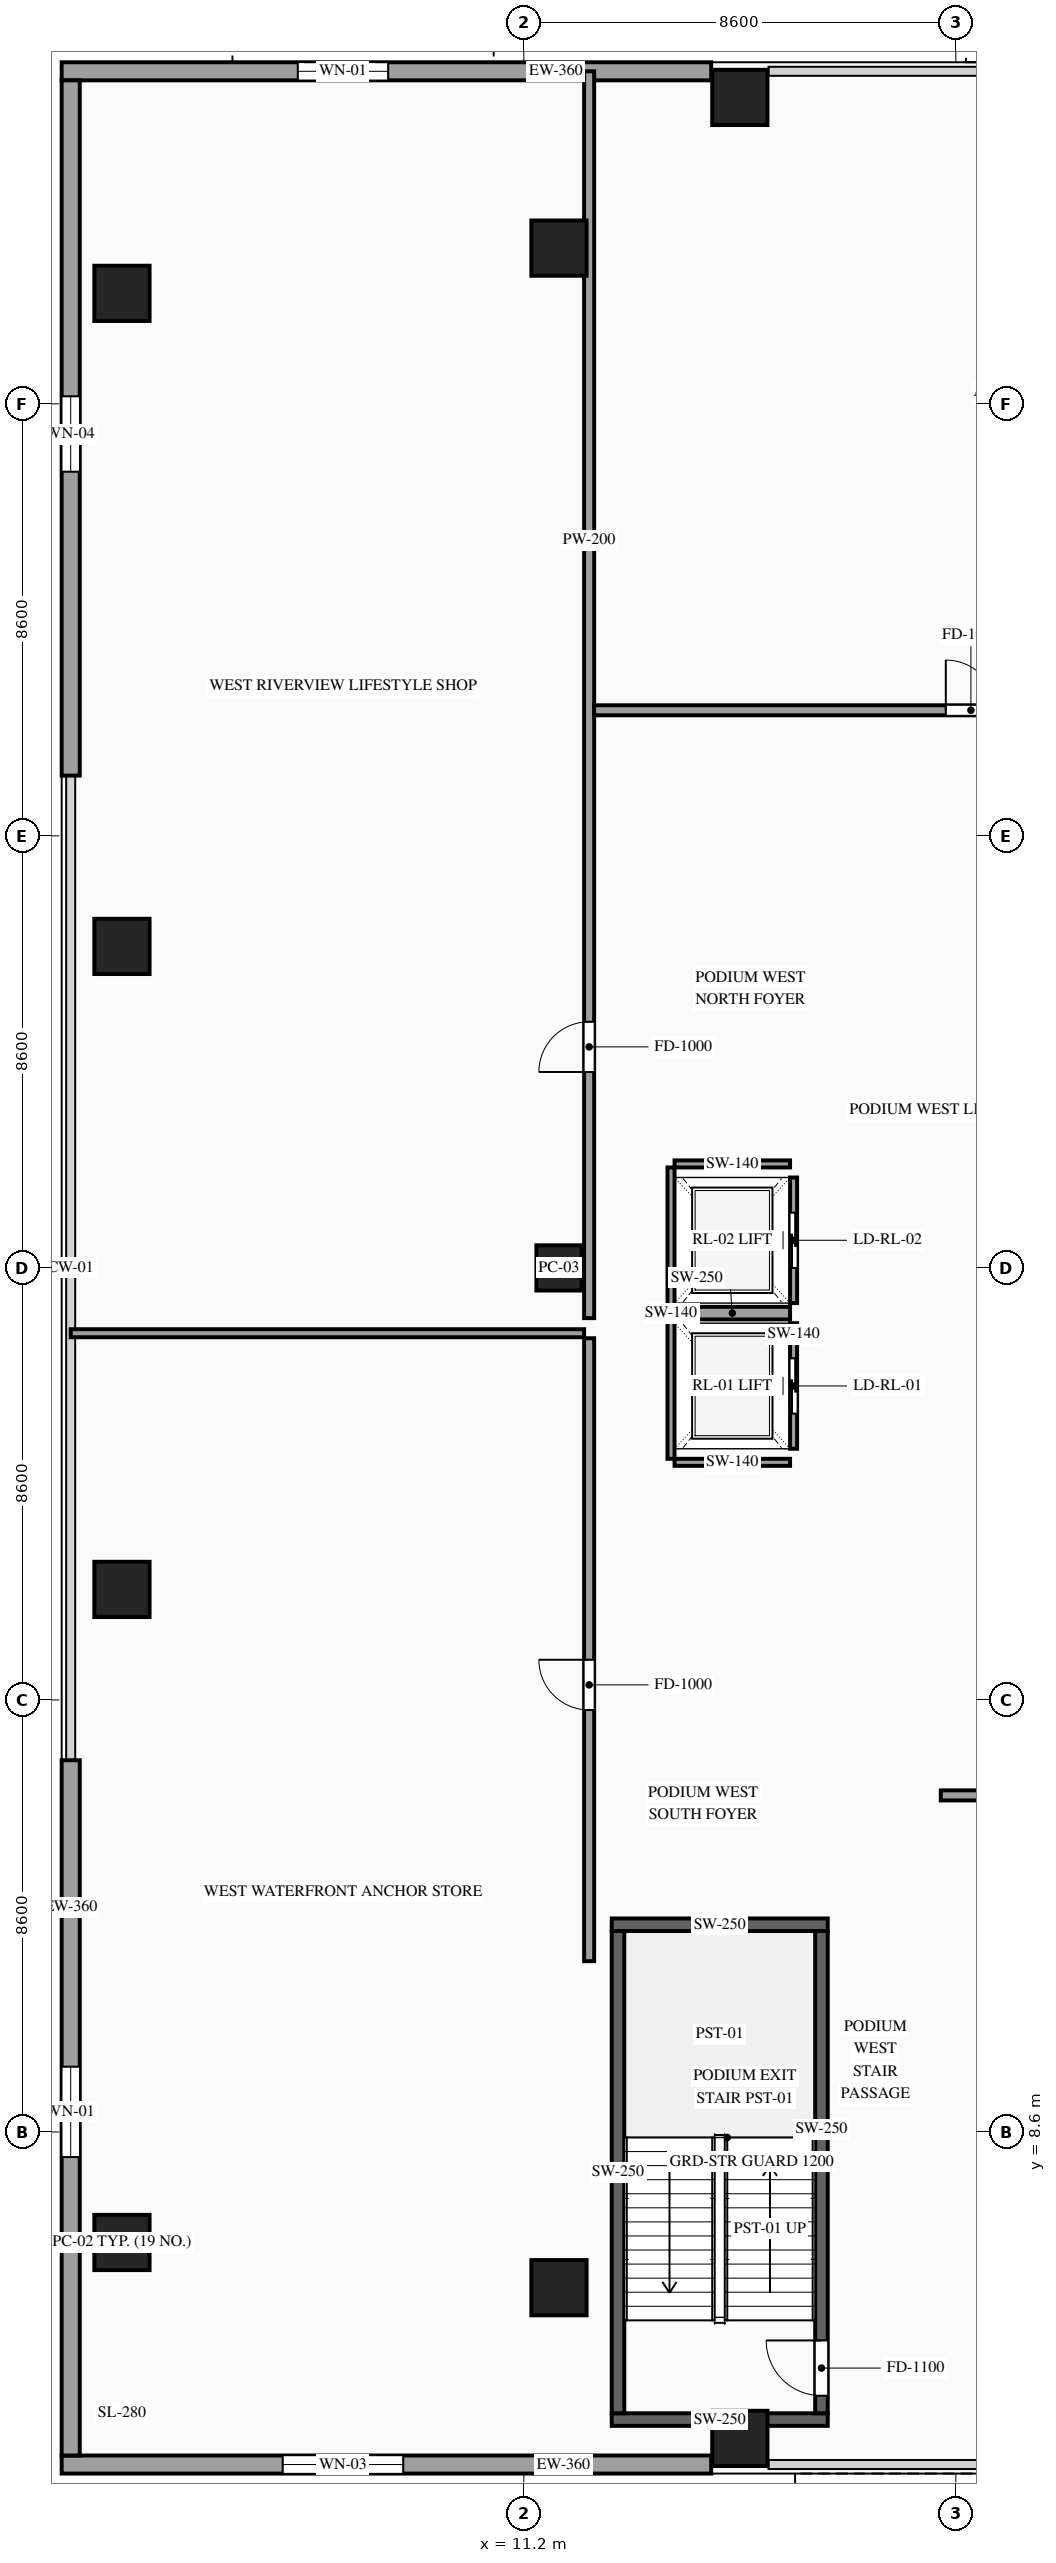
"""IFC4 building model, lengths in metres.
Left out: names, types, materials, properties, quantities, classifications, styles, units other than length and angle.
Written with IfcOpenShell. Run it as: python <this file> out.ifc"""

import sys

from ifc_helpers import new_model, si_unit, direction, frame, frame_2d, origin, origin_2d, place, context, subcontext, project, spatial, rectangle, extrude, source, transform, mapped, element, fill, save


model = new_model("IFC4")
c1 = context("Model", 3, precision=1e-05, world=origin(), true_north=direction((0.0, 1.0)))
c2 = subcontext(c1, "Body", "Model", "MODEL_VIEW")
j1 = project(units=[si_unit("LENGTHUNIT", "METRE"), si_unit("PLANEANGLEUNIT", "RADIAN")], contexts=[c1])
p1 = place(None, origin())
s1 = spatial("IfcSite", under=j1, at=p1, CompositionType="ELEMENT")
p2 = place(p1, origin())
s2 = spatial("IfcBuilding", under=s1, at=p2, CompositionType="ELEMENT")
p3 = place(p2, frame((0.0, 0.0, 5.4)))
s3 = spatial("IfcBuildingStorey", under=s2, at=p3, CompositionType="ELEMENT", Elevation=5.4)
m1 = source(origin(), c2, "Body", "SweptSolid", [
    extrude(rectangle(XDim=1.1, YDim=1.1, at=origin_2d()), origin(), (0.0, 0.0, 1.0), 4.8),
])
for number, where, z_axis, x_axis in (
    (1, (3.2, 6.4, 0.0), (0.0, 0.0, 1.0), (1.0, 0.0, 0.0)),
    (2, (3.2, 19.4, 0.0), (0.0, 0.0, 1.0), (1.0, 0.0, 0.0)),
    (3, (3.2, 32.2, 0.0), (0.0, 0.0, 1.0), (1.0, 0.0, 0.0)),
    (4, (3.2, 45.2, 0.0), (0.0, 0.0, 1.0), (1.0, 0.0, 0.0)),
    (5, (11.9, 5.5, 0.0), (0.0, 0.0, 1.0), (1.0, 0.0, 0.0)),
    (6, (11.9, 46.1, 0.0), (0.0, 0.0, 1.0), (1.0, 0.0, 0.0)),
    (7, (15.5, 2.5, 0.0), (0.0, 0.0, 1.0), (1.0, 0.0, 0.0)),
    (8, (15.5, 49.1, 0.0), (0.0, 0.0, 1.0), (1.0, 0.0, 0.0)),
):
    element("IfcColumn", number, at=place(p3, frame(where, z_axis=z_axis, x_axis=x_axis)), inside=s3, PredefinedType="COLUMN", context=c2, shape_type="MappedRepresentation", body=[
        mapped(m1, transform((0.0, 0.0, 0.0), scale=1.0)),
    ])
m2 = source(origin(), c2, "Body", "SweptSolid", [
    extrude(rectangle(XDim=0.9, YDim=0.9, at=origin_2d()), origin(), (0.0, 0.0, 1.0), 4.8),
])
p4 = place(p3, frame((11.9, 25.8, 0.0), z_axis=(0.0, 0.0, 1.0), x_axis=(1.0, 0.0, 0.0)))
e9 = element("IfcColumn", 9, at=p4, inside=s3, PredefinedType="COLUMN", context=c2, shape_type="MappedRepresentation", body=[
    mapped(m2, transform((0.0, 0.0, 0.0), scale=1.0)),
])
p5 = place(p3, frame((2.0, 1.98, 0.0), z_axis=(0.0, 0.0, 1.0), x_axis=(1.0, 0.0, 0.0)))
e10 = element("IfcWall", 10, at=p5, inside=s3, PredefinedType="SOLIDWALL", context=c2, shape_type="SweptSolid", body=[
    extrude(rectangle(XDim=12.93, YDim=0.36, at=frame_2d((6.465, 0.0))), origin(), (0.0, 0.0, 1.0), 4.52),
])
p6 = place(p5, frame((4.4, 0.0, 0.85)))
e11 = element("IfcOpeningElement", 11, at=p6, cuts=e10, PredefinedType="OPENING", context=c2, shape_type="SweptSolid", body=[
    extrude(rectangle(XDim=2.4, YDim=2.4, at=frame_2d((1.2, 1.2))), frame((0.0, 0.195, 0.0), z_axis=(0.0, -1.0, 0.0), x_axis=(1.0, 0.0, 0.0)), (0.0, 0.0, 1.0), 0.39),
])
p7 = place(p3, frame((2.0, 49.62, 0.0), z_axis=(0.0, 0.0, 1.0), x_axis=(1.0, 0.0, 0.0)))
e12 = element("IfcWall", 12, at=p7, inside=s3, PredefinedType="SOLIDWALL", context=c2, shape_type="SweptSolid", body=[
    extrude(rectangle(XDim=12.93, YDim=0.36, at=frame_2d((6.465, 0.0))), origin(), (0.0, 0.0, 1.0), 4.52),
])
p8 = place(p7, frame((4.7, 0.0, 0.9)))
e13 = element("IfcOpeningElement", 13, at=p8, cuts=e12, PredefinedType="OPENING", context=c2, shape_type="SweptSolid", body=[
    extrude(rectangle(XDim=1.8, YDim=2.2, at=frame_2d((0.9, 1.1))), frame((0.0, 0.195, 0.0), z_axis=(0.0, -1.0, 0.0), x_axis=(1.0, 0.0, 0.0)), (0.0, 0.0, 1.0), 0.39),
])
p9 = place(p3, frame((2.18, 2.16, 0.0), z_axis=(0.0, 0.0, 1.0), x_axis=(0.0, 1.0, 0.0)))
e14 = element("IfcWall", 14, at=p9, inside=s3, PredefinedType="SOLIDWALL", context=c2, shape_type="SweptSolid", body=[
    extrude(rectangle(XDim=13.84, YDim=0.36, at=frame_2d((6.92, 0.0))), origin(), (0.0, 0.0, 1.0), 4.52),
])
p10 = place(p9, frame((5.94, 0.0, 0.9)))
e15 = element("IfcOpeningElement", 15, at=p10, cuts=e14, PredefinedType="OPENING", context=c2, shape_type="SweptSolid", body=[
    extrude(rectangle(XDim=1.8, YDim=2.2, at=frame_2d((0.9, 1.1))), frame((0.0, 0.195, 0.0), z_axis=(0.0, -1.0, 0.0), x_axis=(1.0, 0.0, 0.0)), (0.0, 0.0, 1.0), 0.39),
])
p11 = place(p3, frame((2.18, 35.6, 0.0), z_axis=(0.0, 0.0, 1.0), x_axis=(0.0, 1.0, 0.0)))
e16 = element("IfcWall", 16, at=p11, inside=s3, PredefinedType="SOLIDWALL", context=c2, shape_type="SweptSolid", body=[
    extrude(rectangle(XDim=13.84, YDim=0.36, at=frame_2d((6.92, 0.0))), origin(), (0.0, 0.0, 1.0), 4.52),
])
p12 = place(p11, frame((6.05, 0.0, 0.9)))
e17 = element("IfcOpeningElement", 17, at=p12, cuts=e16, PredefinedType="OPENING", context=c2, shape_type="SweptSolid", body=[
    extrude(rectangle(XDim=1.5, YDim=1.8, at=frame_2d((0.75, 0.9))), frame((0.0, 0.195, 0.0), z_axis=(0.0, -1.0, 0.0), x_axis=(1.0, 0.0, 0.0)), (0.0, 0.0, 1.0), 0.39),
])
p13 = place(p3, frame((16.57, 22.2, 0.0), z_axis=(0.0, 0.0, 1.0), x_axis=(0.0, 1.0, 0.0)))
e18 = element("IfcWall", 18, at=p13, inside=s3, PredefinedType="SOLIDWALL", context=c2, shape_type="SweptSolid", body=[
    extrude(rectangle(XDim=2.5, YDim=0.14, at=frame_2d((1.25, 0.0))), origin(), (0.0, 0.0, 1.0), 4.52),
])
p14 = place(p13, frame((0.7, 0.0, 0.0)))
e19 = element("IfcOpeningElement", 19, at=p14, cuts=e18, PredefinedType="OPENING", context=c2, shape_type="SweptSolid", body=[
    extrude(rectangle(XDim=1.1, YDim=2.2, at=frame_2d((0.55, 1.1))), frame((0.0, 0.085, 0.0), z_axis=(0.0, -1.0, 0.0), x_axis=(1.0, 0.0, 0.0)), (0.0, 0.0, 1.0), 0.17),
])
m3 = source(origin(), c2, "Body", "SweptSolid", [
    extrude(rectangle(XDim=2.3, YDim=0.25, at=frame_2d((1.15, 0.0))), origin(), (0.0, 0.0, 1.0), 4.52),
])
p15 = place(p3, frame((14.2, 24.9, 0.0), z_axis=(0.0, 0.0, 1.0), x_axis=(1.0, 0.0, 0.0)))
e20 = element("IfcWall", 20, at=p15, inside=s3, PredefinedType="SOLIDWALL", context=c2, shape_type="MappedRepresentation", body=[
    mapped(m3, transform((0.0, 0.0, 0.0), scale=1.0)),
])
m4 = source(origin(), c2, "Body", "SweptSolid", [
    extrude(rectangle(XDim=5.8, YDim=0.14, at=frame_2d((2.9, 0.0))), origin(), (0.0, 0.0, 1.0), 4.52),
])
p16 = place(p3, frame((14.13, 22.0, 0.0), z_axis=(0.0, 0.0, 1.0), x_axis=(0.0, 1.0, 0.0)))
e21 = element("IfcWall", 21, at=p16, inside=s3, PredefinedType="SOLIDWALL", context=c2, shape_type="MappedRepresentation", body=[
    mapped(m4, transform((0.0, 0.0, 0.0), scale=1.0)),
])
m5 = source(origin(), c2, "Body", "SweptSolid", [
    extrude(rectangle(XDim=2.3, YDim=0.14, at=frame_2d((1.15, 0.0))), origin(), (0.0, 0.0, 1.0), 4.52),
])
p17 = place(p3, frame((14.2, 21.93, 0.0), z_axis=(0.0, 0.0, 1.0), x_axis=(1.0, 0.0, 0.0)))
e22 = element("IfcWall", 22, at=p17, inside=s3, PredefinedType="SOLIDWALL", context=c2, shape_type="MappedRepresentation", body=[
    mapped(m5, transform((0.0, 0.0, 0.0), scale=1.0)),
])
p18 = place(p3, frame((16.57, 25.1, 0.0), z_axis=(0.0, 0.0, 1.0), x_axis=(0.0, 1.0, 0.0)))
e23 = element("IfcWall", 23, at=p18, inside=s3, PredefinedType="SOLIDWALL", context=c2, shape_type="SweptSolid", body=[
    extrude(rectangle(XDim=2.5, YDim=0.14, at=frame_2d((1.25, 0.0))), origin(), (0.0, 0.0, 1.0), 4.52),
])
p19 = place(p18, frame((0.7, 0.0, 0.0)))
e24 = element("IfcOpeningElement", 24, at=p19, cuts=e23, PredefinedType="OPENING", context=c2, shape_type="SweptSolid", body=[
    extrude(rectangle(XDim=1.1, YDim=2.2, at=frame_2d((0.55, 1.1))), frame((0.0, 0.085, 0.0), z_axis=(0.0, -1.0, 0.0), x_axis=(1.0, 0.0, 0.0)), (0.0, 0.0, 1.0), 0.17),
])
p20 = place(p3, frame((14.2, 27.87, 0.0), z_axis=(0.0, 0.0, 1.0), x_axis=(1.0, 0.0, 0.0)))
e25 = element("IfcWall", 25, at=p20, inside=s3, PredefinedType="SOLIDWALL", context=c2, shape_type="MappedRepresentation", body=[
    mapped(m5, transform((0.0, 0.0, 0.0), scale=1.0)),
])
m6 = source(origin(), c2, "Body", "SweptSolid", [
    extrude(rectangle(XDim=4.3, YDim=0.25, at=frame_2d((2.15, 0.0))), origin(), (0.0, 0.0, 1.0), 4.52),
])
for number, where, z_axis, x_axis in (
    (26, (12.95, 2.875, 0.0), (0.0, 0.0, 1.0), (1.0, 0.0, 0.0)),
    (27, (12.95, 12.725, 0.0), (0.0, 0.0, 1.0), (1.0, 0.0, 0.0)),
):
    element("IfcWall", number, at=place(p3, frame(where, z_axis=z_axis, x_axis=x_axis)), inside=s3, PredefinedType="SOLIDWALL", context=c2, shape_type="MappedRepresentation", body=[
        mapped(m6, transform((0.0, 0.0, 0.0), scale=1.0)),
    ])
m7 = source(origin(), c2, "Body", "SweptSolid", [
    extrude(rectangle(XDim=9.6, YDim=0.25, at=frame_2d((4.8, 0.0))), origin(), (0.0, 0.0, 1.0), 4.52),
])
p21 = place(p3, frame((13.075, 3.0, 0.0), z_axis=(0.0, 0.0, 1.0), x_axis=(0.0, 1.0, 0.0)))
e28 = element("IfcWall", 28, at=p21, inside=s3, PredefinedType="SOLIDWALL", context=c2, shape_type="MappedRepresentation", body=[
    mapped(m7, transform((0.0, 0.0, 0.0), scale=1.0)),
])
p22 = place(p3, frame((17.125, 3.0, 0.0), z_axis=(0.0, 0.0, 1.0), x_axis=(0.0, 1.0, 0.0)))
e29 = element("IfcWall", 29, at=p22, inside=s3, PredefinedType="SOLIDWALL", context=c2, shape_type="SweptSolid", body=[
    extrude(rectangle(XDim=9.6, YDim=0.25, at=frame_2d((4.8, 0.0))), origin(), (0.0, 0.0, 1.0), 4.52),
])
p23 = place(p22, frame((0.35, 0.0, 0.0)))
e30 = element("IfcOpeningElement", 30, at=p23, cuts=e29, PredefinedType="OPENING", context=c2, shape_type="SweptSolid", body=[
    extrude(rectangle(XDim=1.1, YDim=2.2, at=frame_2d((0.55, 1.1))), frame((0.0, 0.14, 0.0), z_axis=(0.0, -1.0, 0.0), x_axis=(1.0, 0.0, 0.0)), (0.0, 0.0, 1.0), 0.28),
])
p24 = place(p3, frame((12.5, 12.0, 0.0), z_axis=(0.0, 0.0, 1.0), x_axis=(0.0, 1.0, 0.0)))
e31 = element("IfcWall", 31, at=p24, inside=s3, PredefinedType="PARTITIONING", context=c2, shape_type="SweptSolid", body=[
    extrude(rectangle(XDim=12.4, YDim=0.2, at=frame_2d((6.2, 0.0))), origin(), (0.0, 0.0, 1.0), 4.52),
])
p25 = place(p24, frame((5.0, 0.0, 0.0)))
e32 = element("IfcOpeningElement", 32, at=p25, cuts=e31, PredefinedType="OPENING", context=c2, shape_type="SweptSolid", body=[
    extrude(rectangle(XDim=1.0, YDim=2.2, at=frame_2d((0.5, 1.1))), frame((0.0, 0.115, 0.0), z_axis=(0.0, -1.0, 0.0), x_axis=(1.0, 0.0, 0.0)), (0.0, 0.0, 1.0), 0.23),
])
m8 = source(origin(), c2, "Body", "SweptSolid", [
    extrude(rectangle(XDim=10.22, YDim=0.16, at=frame_2d((5.11, 0.0))), origin(), (0.0, 0.0, 1.0), 4.52),
])
p26 = place(p3, frame((2.18, 24.5, 0.0), z_axis=(0.0, 0.0, 1.0), x_axis=(1.0, 0.0, 0.0)))
e33 = element("IfcWall", 33, at=p26, inside=s3, PredefinedType="PARTITIONING", context=c2, shape_type="MappedRepresentation", body=[
    mapped(m8, transform((0.0, 0.0, 0.0), scale=1.0)),
])
p27 = place(p3, frame((12.5, 24.8, 0.0), z_axis=(0.0, 0.0, 1.0), x_axis=(0.0, 1.0, 0.0)))
e34 = element("IfcWall", 34, at=p27, inside=s3, PredefinedType="PARTITIONING", context=c2, shape_type="SweptSolid", body=[
    extrude(rectangle(XDim=24.82, YDim=0.2, at=frame_2d((12.41, 0.0))), origin(), (0.0, 0.0, 1.0), 4.52),
])
p28 = place(p27, frame((4.9, 0.0, 0.0)))
e35 = element("IfcOpeningElement", 35, at=p28, cuts=e34, PredefinedType="OPENING", context=c2, shape_type="SweptSolid", body=[
    extrude(rectangle(XDim=1.0, YDim=2.2, at=frame_2d((0.5, 1.1))), frame((0.0, 0.115, 0.0), z_axis=(0.0, -1.0, 0.0), x_axis=(1.0, 0.0, 0.0)), (0.0, 0.0, 1.0), 0.23),
])
p29 = place(p3, frame((19.5, 15.3, 0.0), z_axis=(0.0, 0.0, 1.0), x_axis=(1.0, 0.0, 0.0)))
e36 = element("IfcWall", 36, at=p29, inside=s3, PredefinedType="PARTITIONING", context=c2, shape_type="SweptSolid", body=[
    extrude(rectangle(XDim=11.5, YDim=0.2, at=frame_2d((5.75, 0.0))), origin(), (0.0, 0.0, 1.0), 4.52),
])
p30 = place(p29, frame((5.25, 0.0, 0.0)))
e37 = element("IfcOpeningElement", 37, at=p30, cuts=e36, PredefinedType="OPENING", context=c2, shape_type="SweptSolid", body=[
    extrude(rectangle(XDim=1.0, YDim=2.2, at=frame_2d((0.5, 1.1))), frame((0.0, 0.115, 0.0), z_axis=(0.0, -1.0, 0.0), x_axis=(1.0, 0.0, 0.0)), (0.0, 0.0, 1.0), 0.23),
])
p31 = place(p3, frame((12.6, 36.9, 0.0), z_axis=(0.0, 0.0, 1.0), x_axis=(1.0, 0.0, 0.0)))
e38 = element("IfcWall", 38, at=p31, inside=s3, PredefinedType="PARTITIONING", context=c2, shape_type="SweptSolid", body=[
    extrude(rectangle(XDim=15.0, YDim=0.2, at=frame_2d((7.5, 0.0))), origin(), (0.0, 0.0, 1.0), 4.52),
])
p32 = place(p31, frame((7.0, 0.0, 0.0)))
e39 = element("IfcOpeningElement", 39, at=p32, cuts=e38, PredefinedType="OPENING", context=c2, shape_type="SweptSolid", body=[
    extrude(rectangle(XDim=1.0, YDim=2.2, at=frame_2d((0.5, 1.1))), frame((0.0, 0.115, 0.0), z_axis=(0.0, -1.0, 0.0), x_axis=(1.0, 0.0, 0.0)), (0.0, 0.0, 1.0), 0.23),
])
m9 = source(origin(), c2, "Body", "SweptSolid", [
    extrude(rectangle(XDim=2.4, YDim=2.4, at=frame_2d((1.2, 1.2))), frame((0.0, 0.03, 0.0), z_axis=(0.0, -1.0, 0.0), x_axis=(1.0, 0.0, 0.0)), (0.0, 0.0, 1.0), 0.06),
])
p33 = place(p6, origin())
e40 = element("IfcWindow", 40, at=p33, inside=s3, PartitioningType="SINGLE_PANEL", PredefinedType="WINDOW", context=c2, shape_type="MappedRepresentation", body=[
    mapped(m9, transform((0.0, 0.0, 0.0), scale=1.0)),
])
fill(e11, e40)
m10 = source(origin(), c2, "Body", "SweptSolid", [
    extrude(rectangle(XDim=1.8, YDim=2.2, at=frame_2d((0.9, 1.1))), frame((0.0, 0.03, 0.0), z_axis=(0.0, -1.0, 0.0), x_axis=(1.0, 0.0, 0.0)), (0.0, 0.0, 1.0), 0.06),
])
p34 = place(p8, origin())
e41 = element("IfcWindow", 41, at=p34, inside=s3, PartitioningType="SINGLE_PANEL", PredefinedType="WINDOW", context=c2, shape_type="MappedRepresentation", body=[
    mapped(m10, transform((0.0, 0.0, 0.0), scale=1.0)),
])
fill(e13, e41)
p35 = place(p10, origin())
e42 = element("IfcWindow", 42, at=p35, inside=s3, PartitioningType="SINGLE_PANEL", PredefinedType="WINDOW", context=c2, shape_type="MappedRepresentation", body=[
    mapped(m10, transform((0.0, 0.0, 0.0), scale=1.0)),
])
fill(e15, e42)
m11 = source(origin(), c2, "Body", "SweptSolid", [
    extrude(rectangle(XDim=1.5, YDim=1.8, at=frame_2d((0.75, 0.9))), frame((0.0, 0.03, 0.0), z_axis=(0.0, -1.0, 0.0), x_axis=(1.0, 0.0, 0.0)), (0.0, 0.0, 1.0), 0.06),
])
p36 = place(p12, origin())
e43 = element("IfcWindow", 43, at=p36, inside=s3, PartitioningType="SINGLE_PANEL", PredefinedType="WINDOW", context=c2, shape_type="MappedRepresentation", body=[
    mapped(m11, transform((0.0, 0.0, 0.0), scale=1.0)),
])
fill(e17, e43)
m12 = source(origin(), c2, "Body", "SweptSolid", [
    extrude(rectangle(XDim=1.1, YDim=2.2, at=frame_2d((0.55, 1.1))), frame((0.0, 0.025, 0.0), z_axis=(0.0, -1.0, 0.0), x_axis=(1.0, 0.0, 0.0)), (0.0, 0.0, 1.0), 0.05),
])
p37 = place(p14, origin())
e44 = element("IfcDoor", 44, at=p37, inside=s3, OperationType="SLIDING_TO_RIGHT", PredefinedType="DOOR", context=c2, shape_type="MappedRepresentation", body=[
    mapped(m12, transform((0.0, 0.0, 0.0), scale=1.0)),
])
fill(e19, e44)
p38 = place(p19, origin())
e45 = element("IfcDoor", 45, at=p38, inside=s3, OperationType="SLIDING_TO_LEFT", PredefinedType="DOOR", context=c2, shape_type="MappedRepresentation", body=[
    mapped(m12, transform((0.0, 0.0, 0.0), scale=1.0)),
])
fill(e24, e45)
m13 = source(origin(), c2, "Body", "SweptSolid", [
    extrude(rectangle(XDim=1.1, YDim=2.2, at=frame_2d((0.55, 1.1))), frame((0.0, 0.025, 0.0), z_axis=(0.0, -1.0, 0.0), x_axis=(1.0, 0.0, 0.0)), (0.0, 0.0, 1.0), 0.05),
])
p39 = place(p23, origin())
e46 = element("IfcDoor", 46, at=p39, inside=s3, OperationType="SINGLE_SWING_RIGHT", PredefinedType="DOOR", context=c2, shape_type="MappedRepresentation", body=[
    mapped(m13, transform((0.0, 0.0, 0.0), scale=1.0)),
])
fill(e30, e46)
m14 = source(origin(), c2, "Body", "SweptSolid", [
    extrude(rectangle(XDim=1.0, YDim=2.2, at=frame_2d((0.5, 1.1))), frame((0.0, 0.025, 0.0), z_axis=(0.0, -1.0, 0.0), x_axis=(1.0, 0.0, 0.0)), (0.0, 0.0, 1.0), 0.05),
])
p40 = place(p25, origin())
e47 = element("IfcDoor", 47, at=p40, inside=s3, OperationType="SINGLE_SWING_RIGHT", PredefinedType="DOOR", context=c2, shape_type="MappedRepresentation", body=[
    mapped(m14, transform((0.0, 0.0, 0.0), scale=1.0)),
])
fill(e32, e47)
p41 = place(p28, origin())
e48 = element("IfcDoor", 48, at=p41, inside=s3, OperationType="SINGLE_SWING_LEFT", PredefinedType="DOOR", context=c2, shape_type="MappedRepresentation", body=[
    mapped(m14, transform((0.0, 0.0, 0.0), scale=1.0)),
])
fill(e35, e48)
p42 = place(p32, origin())
e49 = element("IfcDoor", 49, at=p42, inside=s3, OperationType="SINGLE_SWING_LEFT", PredefinedType="DOOR", context=c2, shape_type="MappedRepresentation", body=[
    mapped(m14, transform((0.0, 0.0, 0.0), scale=1.0)),
])
fill(e39, e49)
save(model, sys.argv[1])
